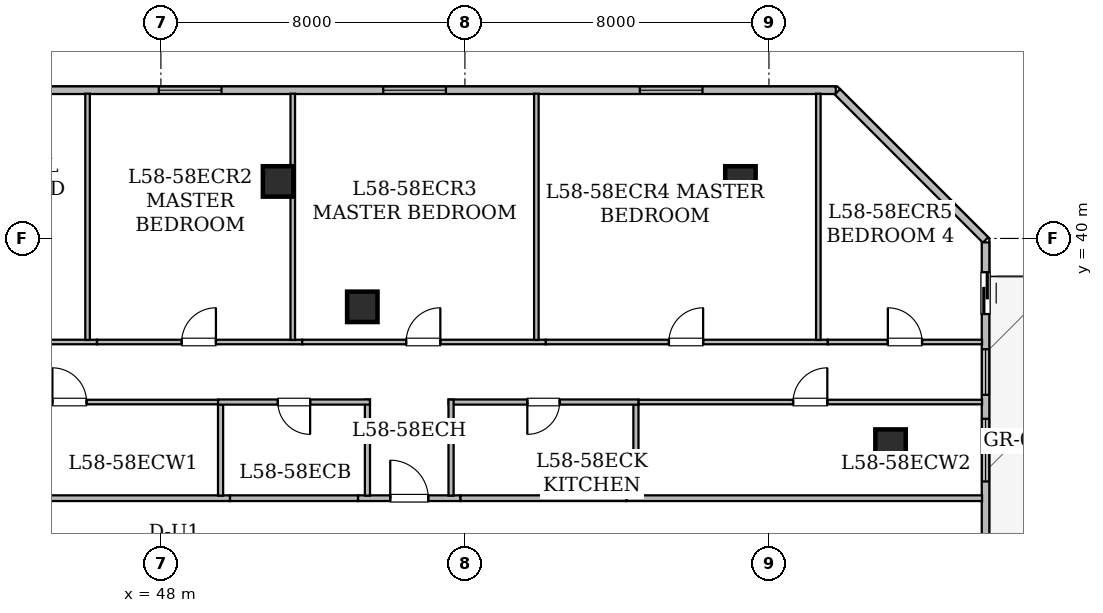
"""IFC4 building model, lengths in metres.
Left out: names, types, materials, properties, quantities, classifications, styles, units other than length and angle.
Written with IfcOpenShell. Run it as: python <this file> out.ifc"""

import sys

from ifc_helpers import new_model, si_unit, direction, frame, frame_2d, origin, origin_2d, place, context, subcontext, project, spatial, rectangle, hollow_rectangle, extrude, element, fill, save


model = new_model("IFC4")
c1 = context("Model", 3, precision=1e-05, world=origin(), true_north=direction((0.0, 1.0)))
c2 = subcontext(c1, "Body", "Model", "MODEL_VIEW")
j1 = project(units=[si_unit("LENGTHUNIT", "METRE"), si_unit("PLANEANGLEUNIT", "RADIAN")], contexts=[c1])
p1 = place(None, origin())
s1 = spatial("IfcSite", under=j1, at=p1, CompositionType="ELEMENT")
p2 = place(p1, origin())
s2 = spatial("IfcBuilding", under=s1, at=p2, CompositionType="ELEMENT")
p3 = place(p2, frame((0.0, 0.0, 228.15)))
s3 = spatial("IfcBuildingStorey", under=s2, at=p3, CompositionType="ELEMENT", Elevation=228.15)
for number, where, z_axis, x_axis in (
    (1, (51.083, 41.5, 0.0), (0.0, 0.0, 1.0), (1.0, 0.0, 0.0)),
    (2, (63.25, 41.5, 0.0), (0.0, 0.0, 1.0), (1.0, 0.0, 0.0)),
    (3, (67.2, 34.575, 0.0), (0.0, 0.0, 1.0), (1.0, 0.0, 0.0)),
    (4, (53.3, 38.2, 0.0), (0.0, 0.0, 1.0), (1.0, 0.0, 0.0)),
):
    element("IfcColumn", number, at=place(p3, frame(where, z_axis=z_axis, x_axis=x_axis)), inside=s3, PredefinedType="COLUMN", context=c2, shape_type="SweptSolid", body=[
        extrude(hollow_rectangle(XDim=0.8, YDim=0.8, WallThickness=0.04, at=origin_2d()), origin(), (0.0, 0.0, 1.0), 3.65),
    ])
p4 = place(p3, frame((24.302, 43.9, 0.0), z_axis=(0.0, 0.0, 1.0), x_axis=(1.0, 0.0, 0.0)))
e5 = element("IfcWall", 5, at=p4, inside=s3, PredefinedType="STANDARD", context=c2, shape_type="SweptSolid", body=[
    extrude(rectangle(XDim=41.457, YDim=0.2, at=frame_2d((20.729, 0.0))), origin(), (0.0, 0.0, 1.0), 3.43),
])
p5 = place(p4, frame((0.584, 0.0, 0.85)))
e6 = element("IfcOpeningElement", 6, at=p5, cuts=e5, PredefinedType="OPENING", context=c2, shape_type="SweptSolid", body=[
    extrude(rectangle(XDim=1.65, YDim=1.55, at=frame_2d((0.825, 0.775))), frame((0.0, 0.11, 0.0), z_axis=(0.0, -1.0, 0.0), x_axis=(1.0, 0.0, 0.0)), (0.0, 0.0, 1.0), 0.22),
])
p6 = place(p4, frame((9.098, 0.0, 0.85)))
e7 = element("IfcOpeningElement", 7, at=p6, cuts=e5, PredefinedType="OPENING", context=c2, shape_type="SweptSolid", body=[
    extrude(rectangle(XDim=1.65, YDim=1.55, at=frame_2d((0.825, 0.775))), frame((0.0, 0.11, 0.0), z_axis=(0.0, -1.0, 0.0), x_axis=(1.0, 0.0, 0.0)), (0.0, 0.0, 1.0), 0.22),
])
p7 = place(p4, frame((14.405, 0.0, 0.85)))
e8 = element("IfcOpeningElement", 8, at=p7, cuts=e5, PredefinedType="OPENING", context=c2, shape_type="SweptSolid", body=[
    extrude(rectangle(XDim=1.65, YDim=1.55, at=frame_2d((0.825, 0.775))), frame((0.0, 0.11, 0.0), z_axis=(0.0, -1.0, 0.0), x_axis=(1.0, 0.0, 0.0)), (0.0, 0.0, 1.0), 0.22),
])
p8 = place(p4, frame((18.716, 0.0, 0.85)))
e9 = element("IfcOpeningElement", 9, at=p8, cuts=e5, PredefinedType="OPENING", context=c2, shape_type="SweptSolid", body=[
    extrude(rectangle(XDim=1.65, YDim=1.55, at=frame_2d((0.825, 0.775))), frame((0.0, 0.11, 0.0), z_axis=(0.0, -1.0, 0.0), x_axis=(1.0, 0.0, 0.0)), (0.0, 0.0, 1.0), 0.22),
])
p9 = place(p4, frame((23.643, 0.0, 0.85)))
e10 = element("IfcOpeningElement", 10, at=p9, cuts=e5, PredefinedType="OPENING", context=c2, shape_type="SweptSolid", body=[
    extrude(rectangle(XDim=1.65, YDim=1.55, at=frame_2d((0.825, 0.775))), frame((0.0, 0.11, 0.0), z_axis=(0.0, -1.0, 0.0), x_axis=(1.0, 0.0, 0.0)), (0.0, 0.0, 1.0), 0.22),
])
p10 = place(p4, frame((29.548, 0.0, 0.85)))
e11 = element("IfcOpeningElement", 11, at=p10, cuts=e5, PredefinedType="OPENING", context=c2, shape_type="SweptSolid", body=[
    extrude(rectangle(XDim=1.65, YDim=1.55, at=frame_2d((0.825, 0.775))), frame((0.0, 0.11, 0.0), z_axis=(0.0, -1.0, 0.0), x_axis=(1.0, 0.0, 0.0)), (0.0, 0.0, 1.0), 0.22),
])
p11 = place(p4, frame((36.3, 0.0, 0.85)))
e12 = element("IfcOpeningElement", 12, at=p11, cuts=e5, PredefinedType="OPENING", context=c2, shape_type="SweptSolid", body=[
    extrude(rectangle(XDim=1.65, YDim=1.55, at=frame_2d((0.825, 0.775))), frame((0.0, 0.11, 0.0), z_axis=(0.0, -1.0, 0.0), x_axis=(1.0, 0.0, 0.0)), (0.0, 0.0, 1.0), 0.22),
])
p12 = place(p3, frame((65.802, 43.857, 0.0), z_axis=(0.0, 0.0, 1.0), x_axis=(0.707106781187, -0.707106781187, 0.0)))
e13 = element("IfcWall", 13, at=p12, inside=s3, PredefinedType="STANDARD", context=c2, shape_type="SweptSolid", body=[
    extrude(rectangle(XDim=5.512, YDim=0.2, at=frame_2d((2.756, 0.0))), origin(), (0.0, 0.0, 1.0), 3.43),
])
p13 = place(p3, frame((69.7, 39.896, 0.0), z_axis=(0.0, 0.0, 1.0), x_axis=(0.0, -1.0, 0.0)))
e14 = element("IfcWall", 14, at=p13, inside=s3, PredefinedType="STANDARD", context=c2, shape_type="SweptSolid", body=[
    extrude(rectangle(XDim=8.863, YDim=0.2, at=frame_2d((4.432, 0.0))), origin(), (0.0, 0.0, 1.0), 3.43),
])
p14 = place(p13, frame((0.785, 0.0, 0.0)))
e15 = element("IfcOpeningElement", 15, at=p14, cuts=e14, PredefinedType="OPENING", context=c2, shape_type="SweptSolid", body=[
    extrude(rectangle(XDim=1.1, YDim=2.2, at=frame_2d((0.55, 1.1))), frame((0.0, 0.11, 0.0), z_axis=(0.0, -1.0, 0.0), x_axis=(1.0, 0.0, 0.0)), (0.0, 0.0, 1.0), 0.22),
])
p15 = place(p13, frame((4.641, 0.0, 0.85)))
e16 = element("IfcOpeningElement", 16, at=p15, cuts=e14, PredefinedType="OPENING", context=c2, shape_type="SweptSolid", body=[
    extrude(rectangle(XDim=1.65, YDim=1.55, at=frame_2d((0.825, 0.775))), frame((0.0, 0.11, 0.0), z_axis=(0.0, -1.0, 0.0), x_axis=(1.0, 0.0, 0.0)), (0.0, 0.0, 1.0), 0.22),
])
p16 = place(p13, frame((2.811, 0.0, 0.8)))
e17 = element("IfcOpeningElement", 17, at=p16, cuts=e14, PredefinedType="OPENING", context=c2, shape_type="SweptSolid", body=[
    extrude(rectangle(XDim=1.2, YDim=1.5, at=frame_2d((0.6, 0.75))), frame((0.0, 0.11, 0.0), z_axis=(0.0, -1.0, 0.0), x_axis=(1.0, 0.0, 0.0)), (0.0, 0.0, 1.0), 0.22),
])
p17 = place(p3, frame((41.55, 33.165, 0.0), z_axis=(0.0, 0.0, 1.0), x_axis=(1.0, 0.0, 0.0)))
e18 = element("IfcWall", 18, at=p17, inside=s3, PredefinedType="STANDARD", context=c2, shape_type="SweptSolid", body=[
    extrude(rectangle(XDim=8.269, YDim=0.15, at=frame_2d((4.135, 0.0))), origin(), (0.0, 0.0, 1.0), 3.065),
])
p18 = place(p3, frame((60.251, 33.165, 0.0), z_axis=(0.0, 0.0, 1.0), x_axis=(1.0, 0.0, 0.0)))
e19 = element("IfcWall", 19, at=p18, inside=s3, PredefinedType="STANDARD", context=c2, shape_type="SweptSolid", body=[
    extrude(rectangle(XDim=9.357, YDim=0.15, at=frame_2d((4.678, 0.0))), origin(), (0.0, 0.0, 1.0), 2.887),
])
p19 = place(p3, frame((53.186, 33.165, 0.0), z_axis=(0.0, 0.0, 1.0), x_axis=(1.0, 0.0, 0.0)))
e20 = element("IfcWall", 20, at=p19, inside=s3, PredefinedType="STANDARD", context=c2, shape_type="SweptSolid", body=[
    extrude(rectangle(XDim=2.698, YDim=0.15, at=frame_2d((1.349, 0.0))), origin(), (0.0, 0.0, 1.0), 2.725),
])
p20 = place(p19, frame((0.849, 0.0, 0.0)))
e21 = element("IfcOpeningElement", 21, at=p20, cuts=e20, PredefinedType="OPENING", context=c2, shape_type="SweptSolid", body=[
    extrude(rectangle(XDim=1.0, YDim=2.15, at=frame_2d((0.5, 1.075))), frame((0.0, 0.085, 0.0), z_axis=(0.0, -1.0, 0.0), x_axis=(1.0, 0.0, 0.0)), (0.0, 0.0, 1.0), 0.17),
])
p21 = place(p3, frame((49.819, 33.165, 0.0), z_axis=(0.0, 0.0, 1.0), x_axis=(1.0, 0.0, 0.0)))
e22 = element("IfcWall", 22, at=p21, inside=s3, PredefinedType="STANDARD", context=c2, shape_type="SweptSolid", body=[
    extrude(rectangle(XDim=3.367, YDim=0.15, at=frame_2d((1.684, 0.0))), origin(), (0.0, 0.0, 1.0), 2.725),
])
p22 = place(p3, frame((55.884, 33.165, 0.0), z_axis=(0.0, 0.0, 1.0), x_axis=(1.0, 0.0, 0.0)))
e23 = element("IfcWall", 23, at=p22, inside=s3, PredefinedType="STANDARD", context=c2, shape_type="SweptSolid", body=[
    extrude(rectangle(XDim=4.367, YDim=0.15, at=frame_2d((2.184, 0.0))), origin(), (0.0, 0.0, 1.0), 3.065),
])
p23 = place(p3, frame((41.682, 35.695, 0.0), z_axis=(0.0, 0.0, 1.0), x_axis=(1.0, 0.0, 0.0)))
e24 = element("IfcWall", 24, at=p23, inside=s3, PredefinedType="PARTITIONING", context=c2, shape_type="SweptSolid", body=[
    extrude(rectangle(XDim=7.823, YDim=0.12, at=frame_2d((3.912, 0.0))), origin(), (0.0, 0.0, 1.0), 3.43),
])
p24 = place(p23, frame((3.462, 0.0, 0.0)))
e25 = element("IfcOpeningElement", 25, at=p24, cuts=e24, PredefinedType="OPENING", context=c2, shape_type="SweptSolid", body=[
    extrude(rectangle(XDim=0.9, YDim=2.1, at=frame_2d((0.45, 1.05))), frame((0.0, 0.07, 0.0), z_axis=(0.0, -1.0, 0.0), x_axis=(1.0, 0.0, 0.0)), (0.0, 0.0, 1.0), 0.14),
])
p25 = place(p3, frame((49.57, 35.63, 0.0), z_axis=(0.0, 0.0, 1.0), x_axis=(0.0, -1.0, 0.0)))
e26 = element("IfcWall", 26, at=p25, inside=s3, PredefinedType="PARTITIONING", context=c2, shape_type="SweptSolid", body=[
    extrude(rectangle(XDim=2.398, YDim=0.135, at=frame_2d((1.199, 0.0))), origin(), (0.0, 0.0, 1.0), 3.065),
])
p26 = place(p3, frame((60.565, 35.695, 0.0), z_axis=(0.0, 0.0, 1.0), x_axis=(1.0, 0.0, 0.0)))
e27 = element("IfcWall", 27, at=p26, inside=s3, PredefinedType="PARTITIONING", context=c2, shape_type="SweptSolid", body=[
    extrude(rectangle(XDim=9.043, YDim=0.12, at=frame_2d((4.521, 0.0))), origin(), (0.0, 0.0, 1.0), 2.725),
])
p27 = place(p26, frame((4.071, 0.0, 0.0)))
e28 = element("IfcOpeningElement", 28, at=p27, cuts=e27, PredefinedType="OPENING", context=c2, shape_type="SweptSolid", body=[
    extrude(rectangle(XDim=0.9, YDim=2.1, at=frame_2d((0.45, 1.05))), frame((0.0, 0.07, 0.0), z_axis=(0.0, -1.0, 0.0), x_axis=(1.0, 0.0, 0.0)), (0.0, 0.0, 1.0), 0.14),
])
p28 = place(p3, frame((60.5, 33.232, 0.0), z_axis=(0.0, 0.0, 1.0), x_axis=(0.0, 1.0, 0.0)))
e29 = element("IfcWall", 29, at=p28, inside=s3, PredefinedType="PARTITIONING", context=c2, shape_type="SweptSolid", body=[
    extrude(rectangle(XDim=2.398, YDim=0.135, at=frame_2d((1.199, 0.0))), origin(), (0.0, 0.0, 1.0), 3.065),
])
p29 = place(p3, frame((53.435, 33.232, 0.0), z_axis=(0.0, 0.0, 1.0), x_axis=(0.0, 1.0, 0.0)))
e30 = element("IfcWall", 30, at=p29, inside=s3, PredefinedType="PARTITIONING", context=c2, shape_type="SweptSolid", body=[
    extrude(rectangle(XDim=2.528, YDim=0.135, at=frame_2d((1.264, 0.0))), origin(), (0.0, 0.0, 1.0), 2.725),
])
p30 = place(p3, frame((53.5, 35.695, 0.0), z_axis=(0.0, 0.0, 1.0), x_axis=(-1.0, 0.0, 0.0)))
e31 = element("IfcWall", 31, at=p30, inside=s3, PredefinedType="PARTITIONING", context=c2, shape_type="SweptSolid", body=[
    extrude(rectangle(XDim=3.995, YDim=0.135, at=frame_2d((1.998, 0.0))), origin(), (0.0, 0.0, 1.0), 2.725),
])
p31 = place(p30, frame((1.573, 0.0, 0.0)))
e32 = element("IfcOpeningElement", 32, at=p31, cuts=e31, PredefinedType="OPENING", context=c2, shape_type="SweptSolid", body=[
    extrude(rectangle(XDim=0.85, YDim=2.1, at=frame_2d((0.425, 1.05))), frame((0.0, 0.077, 0.0), z_axis=(0.0, -1.0, 0.0), x_axis=(1.0, 0.0, 0.0)), (0.0, 0.0, 1.0), 0.155),
])
p32 = place(p3, frame((60.565, 35.695, 0.0), z_axis=(0.0, 0.0, 1.0), x_axis=(-1.0, 0.0, 0.0)))
e33 = element("IfcWall", 33, at=p32, inside=s3, PredefinedType="PARTITIONING", context=c2, shape_type="SweptSolid", body=[
    extrude(rectangle(XDim=4.995, YDim=0.135, at=frame_2d((2.498, 0.0))), origin(), (0.0, 0.0, 1.0), 3.43),
])
p33 = place(p32, frame((2.073, 0.0, 0.0)))
e34 = element("IfcOpeningElement", 34, at=p33, cuts=e33, PredefinedType="OPENING", context=c2, shape_type="SweptSolid", body=[
    extrude(rectangle(XDim=0.85, YDim=2.1, at=frame_2d((0.425, 1.05))), frame((0.0, 0.077, 0.0), z_axis=(0.0, -1.0, 0.0), x_axis=(1.0, 0.0, 0.0)), (0.0, 0.0, 1.0), 0.155),
])
p34 = place(p3, frame((55.635, 35.76, 0.0), z_axis=(0.0, 0.0, 1.0), x_axis=(0.0, -1.0, 0.0)))
e35 = element("IfcWall", 35, at=p34, inside=s3, PredefinedType="PARTITIONING", context=c2, shape_type="SweptSolid", body=[
    extrude(rectangle(XDim=2.528, YDim=0.135, at=frame_2d((1.264, 0.0))), origin(), (0.0, 0.0, 1.0), 3.065),
])
p35 = place(p3, frame((41.682, 37.275, 0.0), z_axis=(0.0, 0.0, 1.0), x_axis=(1.0, 0.0, 0.0)))
e36 = element("IfcWall", 36, at=p35, inside=s3, PredefinedType="PARTITIONING", context=c2, shape_type="SweptSolid", body=[
    extrude(rectangle(XDim=4.637, YDim=0.12, at=frame_2d((2.319, 0.0))), origin(), (0.0, 0.0, 1.0), 2.725),
])
p36 = place(p35, frame((1.847, 0.0, 0.0)))
e37 = element("IfcOpeningElement", 37, at=p36, cuts=e36, PredefinedType="OPENING", context=c2, shape_type="SweptSolid", body=[
    extrude(rectangle(XDim=0.9, YDim=2.1, at=frame_2d((0.45, 1.05))), frame((0.0, 0.07, 0.0), z_axis=(0.0, -1.0, 0.0), x_axis=(1.0, 0.0, 0.0)), (0.0, 0.0, 1.0), 0.14),
])
p37 = place(p3, frame((46.319, 37.275, 0.0), z_axis=(0.0, 0.0, 1.0), x_axis=(1.0, 0.0, 0.0)))
e38 = element("IfcWall", 38, at=p37, inside=s3, PredefinedType="PARTITIONING", context=c2, shape_type="SweptSolid", body=[
    extrude(rectangle(XDim=5.4, YDim=0.12, at=frame_2d((2.7, 0.0))), origin(), (0.0, 0.0, 1.0), 2.725),
])
p38 = place(p37, frame((2.229, 0.0, 0.0)))
e39 = element("IfcOpeningElement", 39, at=p38, cuts=e38, PredefinedType="OPENING", context=c2, shape_type="SweptSolid", body=[
    extrude(rectangle(XDim=0.9, YDim=2.1, at=frame_2d((0.45, 1.05))), frame((0.0, 0.07, 0.0), z_axis=(0.0, -1.0, 0.0), x_axis=(1.0, 0.0, 0.0)), (0.0, 0.0, 1.0), 0.14),
])
p39 = place(p3, frame((51.719, 37.275, 0.0), z_axis=(0.0, 0.0, 1.0), x_axis=(1.0, 0.0, 0.0)))
e40 = element("IfcWall", 40, at=p39, inside=s3, PredefinedType="PARTITIONING", context=c2, shape_type="SweptSolid", body=[
    extrude(rectangle(XDim=6.41, YDim=0.12, at=frame_2d((3.205, 0.0))), origin(), (0.0, 0.0, 1.0), 2.725),
])
p40 = place(p39, frame((2.734, 0.0, 0.0)))
e41 = element("IfcOpeningElement", 41, at=p40, cuts=e40, PredefinedType="OPENING", context=c2, shape_type="SweptSolid", body=[
    extrude(rectangle(XDim=0.9, YDim=2.1, at=frame_2d((0.45, 1.05))), frame((0.0, 0.07, 0.0), z_axis=(0.0, -1.0, 0.0), x_axis=(1.0, 0.0, 0.0)), (0.0, 0.0, 1.0), 0.14),
])
p41 = place(p3, frame((58.129, 37.275, 0.0), z_axis=(0.0, 0.0, 1.0), x_axis=(1.0, 0.0, 0.0)))
e42 = element("IfcWall", 42, at=p41, inside=s3, PredefinedType="PARTITIONING", context=c2, shape_type="SweptSolid", body=[
    extrude(rectangle(XDim=7.42, YDim=0.12, at=frame_2d((3.71, 0.0))), origin(), (0.0, 0.0, 1.0), 2.725),
])
p42 = place(p41, frame((3.239, 0.0, 0.0)))
e43 = element("IfcOpeningElement", 43, at=p42, cuts=e42, PredefinedType="OPENING", context=c2, shape_type="SweptSolid", body=[
    extrude(rectangle(XDim=0.9, YDim=2.1, at=frame_2d((0.45, 1.05))), frame((0.0, 0.07, 0.0), z_axis=(0.0, -1.0, 0.0), x_axis=(1.0, 0.0, 0.0)), (0.0, 0.0, 1.0), 0.14),
])
p43 = place(p3, frame((65.549, 37.275, 0.0), z_axis=(0.0, 0.0, 1.0), x_axis=(1.0, 0.0, 0.0)))
e44 = element("IfcWall", 44, at=p43, inside=s3, PredefinedType="PARTITIONING", context=c2, shape_type="SweptSolid", body=[
    extrude(rectangle(XDim=4.059, YDim=0.12, at=frame_2d((2.029, 0.0))), origin(), (0.0, 0.0, 1.0), 2.887),
])
p44 = place(p43, frame((1.58, 0.0, 0.0)))
e45 = element("IfcOpeningElement", 45, at=p44, cuts=e44, PredefinedType="OPENING", context=c2, shape_type="SweptSolid", body=[
    extrude(rectangle(XDim=0.9, YDim=2.1, at=frame_2d((0.45, 1.05))), frame((0.0, 0.07, 0.0), z_axis=(0.0, -1.0, 0.0), x_axis=(1.0, 0.0, 0.0)), (0.0, 0.0, 1.0), 0.14),
])
for number, where, z_axis, x_axis in (
    (46, (46.07, 43.808, 0.0), (0.0, 0.0, 1.0), (0.0, -1.0, 0.0)),
    (47, (51.47, 43.808, 0.0), (0.0, 0.0, 1.0), (0.0, -1.0, 0.0)),
    (48, (57.88, 43.808, 0.0), (0.0, 0.0, 1.0), (0.0, -1.0, 0.0)),
):
    element("IfcWall", number, at=place(p3, frame(where, z_axis=z_axis, x_axis=x_axis)), inside=s3, PredefinedType="PARTITIONING", context=c2, shape_type="SweptSolid", body=[
        extrude(rectangle(XDim=6.479, YDim=0.12, at=frame_2d((3.24, 0.0))), origin(), (0.0, 0.0, 1.0), 2.725),
    ])
p45 = place(p3, frame((65.3, 43.808, 0.0), z_axis=(0.0, 0.0, 1.0), x_axis=(0.0, -1.0, 0.0)))
e49 = element("IfcWall", 49, at=p45, inside=s3, PredefinedType="PARTITIONING", context=c2, shape_type="SweptSolid", body=[
    extrude(rectangle(XDim=6.479, YDim=0.12, at=frame_2d((3.24, 0.0))), origin(), (0.0, 0.0, 1.0), 2.887),
])
p46 = place(p14, origin())
e50 = element("IfcDoor", 50, at=p46, inside=s3, OperationType="SLIDING_TO_LEFT", PredefinedType="DOOR", context=c2, shape_type="SweptSolid", body=[
    extrude(rectangle(XDim=1.1, YDim=2.2, at=frame_2d((0.55, 1.1))), frame((0.0, 0.025, 0.0), z_axis=(0.0, -1.0, 0.0), x_axis=(1.0, 0.0, 0.0)), (0.0, 0.0, 1.0), 0.05),
])
fill(e15, e50)
p47 = place(p15, origin())
e51 = element("IfcWindow", 51, at=p47, inside=s3, PartitioningType="SINGLE_PANEL", PredefinedType="WINDOW", context=c2, shape_type="SweptSolid", body=[
    extrude(rectangle(XDim=1.65, YDim=1.55, at=frame_2d((0.825, 0.775))), frame((0.0, 0.03, 0.0), z_axis=(0.0, -1.0, 0.0), x_axis=(1.0, 0.0, 0.0)), (0.0, 0.0, 1.0), 0.06),
])
fill(e16, e51)
p48 = place(p16, origin())
e52 = element("IfcWindow", 52, at=p48, inside=s3, PartitioningType="SINGLE_PANEL", PredefinedType="WINDOW", context=c2, shape_type="SweptSolid", body=[
    extrude(rectangle(XDim=1.2, YDim=1.5, at=frame_2d((0.6, 0.75))), frame((0.0, 0.03, 0.0), z_axis=(0.0, -1.0, 0.0), x_axis=(1.0, 0.0, 0.0)), (0.0, 0.0, 1.0), 0.06),
])
fill(e17, e52)
p49 = place(p9, origin())
e53 = element("IfcWindow", 53, at=p49, inside=s3, PartitioningType="SINGLE_PANEL", PredefinedType="WINDOW", context=c2, shape_type="SweptSolid", body=[
    extrude(rectangle(XDim=1.65, YDim=1.55, at=frame_2d((0.825, 0.775))), frame((0.0, 0.03, 0.0), z_axis=(0.0, -1.0, 0.0), x_axis=(1.0, 0.0, 0.0)), (0.0, 0.0, 1.0), 0.06),
])
fill(e10, e53)
p50 = place(p10, origin())
e54 = element("IfcWindow", 54, at=p50, inside=s3, PartitioningType="SINGLE_PANEL", PredefinedType="WINDOW", context=c2, shape_type="SweptSolid", body=[
    extrude(rectangle(XDim=1.65, YDim=1.55, at=frame_2d((0.825, 0.775))), frame((0.0, 0.03, 0.0), z_axis=(0.0, -1.0, 0.0), x_axis=(1.0, 0.0, 0.0)), (0.0, 0.0, 1.0), 0.06),
])
fill(e11, e54)
p51 = place(p11, origin())
e55 = element("IfcWindow", 55, at=p51, inside=s3, PartitioningType="SINGLE_PANEL", PredefinedType="WINDOW", context=c2, shape_type="SweptSolid", body=[
    extrude(rectangle(XDim=1.65, YDim=1.55, at=frame_2d((0.825, 0.775))), frame((0.0, 0.03, 0.0), z_axis=(0.0, -1.0, 0.0), x_axis=(1.0, 0.0, 0.0)), (0.0, 0.0, 1.0), 0.06),
])
fill(e12, e55)
p52 = place(p20, origin())
e56 = element("IfcDoor", 56, at=p52, inside=s3, OperationType="SINGLE_SWING_LEFT", PredefinedType="DOOR", context=c2, shape_type="SweptSolid", body=[
    extrude(rectangle(XDim=1.0, YDim=2.15, at=frame_2d((0.5, 1.075))), frame((0.0, 0.025, 0.0), z_axis=(0.0, -1.0, 0.0), x_axis=(1.0, 0.0, 0.0)), (0.0, 0.0, 1.0), 0.05),
])
fill(e21, e56)
p53 = place(p24, origin())
e57 = element("IfcDoor", 57, at=p53, inside=s3, OperationType="SINGLE_SWING_LEFT", PredefinedType="DOOR", context=c2, shape_type="SweptSolid", body=[
    extrude(rectangle(XDim=0.9, YDim=2.1, at=frame_2d((0.45, 1.05))), frame((0.0, 0.025, 0.0), z_axis=(0.0, -1.0, 0.0), x_axis=(1.0, 0.0, 0.0)), (0.0, 0.0, 1.0), 0.05),
])
fill(e25, e57)
p54 = place(p27, origin())
e58 = element("IfcDoor", 58, at=p54, inside=s3, OperationType="SINGLE_SWING_RIGHT", PredefinedType="DOOR", context=c2, shape_type="SweptSolid", body=[
    extrude(rectangle(XDim=0.9, YDim=2.1, at=frame_2d((0.45, 1.05))), frame((0.0, 0.025, 0.0), z_axis=(0.0, -1.0, 0.0), x_axis=(1.0, 0.0, 0.0)), (0.0, 0.0, 1.0), 0.05),
])
fill(e28, e58)
p55 = place(p31, origin())
e59 = element("IfcDoor", 59, at=p55, inside=s3, OperationType="SINGLE_SWING_LEFT", PredefinedType="DOOR", context=c2, shape_type="SweptSolid", body=[
    extrude(rectangle(XDim=0.85, YDim=2.1, at=frame_2d((0.425, 1.05))), frame((0.0, 0.025, 0.0), z_axis=(0.0, -1.0, 0.0), x_axis=(1.0, 0.0, 0.0)), (0.0, 0.0, 1.0), 0.05),
])
fill(e32, e59)
p56 = place(p33, origin())
e60 = element("IfcDoor", 60, at=p56, inside=s3, OperationType="SINGLE_SWING_RIGHT", PredefinedType="DOOR", context=c2, shape_type="SweptSolid", body=[
    extrude(rectangle(XDim=0.85, YDim=2.1, at=frame_2d((0.425, 1.05))), frame((0.0, 0.025, 0.0), z_axis=(0.0, -1.0, 0.0), x_axis=(1.0, 0.0, 0.0)), (0.0, 0.0, 1.0), 0.05),
])
fill(e34, e60)
p57 = place(p38, origin())
e61 = element("IfcDoor", 61, at=p57, inside=s3, OperationType="SINGLE_SWING_RIGHT", PredefinedType="DOOR", context=c2, shape_type="SweptSolid", body=[
    extrude(rectangle(XDim=0.9, YDim=2.1, at=frame_2d((0.45, 1.05))), frame((0.0, 0.025, 0.0), z_axis=(0.0, -1.0, 0.0), x_axis=(1.0, 0.0, 0.0)), (0.0, 0.0, 1.0), 0.05),
])
fill(e39, e61)
p58 = place(p40, origin())
e62 = element("IfcDoor", 62, at=p58, inside=s3, OperationType="SINGLE_SWING_RIGHT", PredefinedType="DOOR", context=c2, shape_type="SweptSolid", body=[
    extrude(rectangle(XDim=0.9, YDim=2.1, at=frame_2d((0.45, 1.05))), frame((0.0, 0.025, 0.0), z_axis=(0.0, -1.0, 0.0), x_axis=(1.0, 0.0, 0.0)), (0.0, 0.0, 1.0), 0.05),
])
fill(e41, e62)
p59 = place(p42, origin())
e63 = element("IfcDoor", 63, at=p59, inside=s3, OperationType="SINGLE_SWING_RIGHT", PredefinedType="DOOR", context=c2, shape_type="SweptSolid", body=[
    extrude(rectangle(XDim=0.9, YDim=2.1, at=frame_2d((0.45, 1.05))), frame((0.0, 0.025, 0.0), z_axis=(0.0, -1.0, 0.0), x_axis=(1.0, 0.0, 0.0)), (0.0, 0.0, 1.0), 0.05),
])
fill(e43, e63)
p60 = place(p44, origin())
e64 = element("IfcDoor", 64, at=p60, inside=s3, OperationType="SINGLE_SWING_LEFT", PredefinedType="DOOR", context=c2, shape_type="SweptSolid", body=[
    extrude(rectangle(XDim=0.9, YDim=2.1, at=frame_2d((0.45, 1.05))), frame((0.0, 0.025, 0.0), z_axis=(0.0, -1.0, 0.0), x_axis=(1.0, 0.0, 0.0)), (0.0, 0.0, 1.0), 0.05),
])
fill(e45, e64)
save(model, sys.argv[1])
